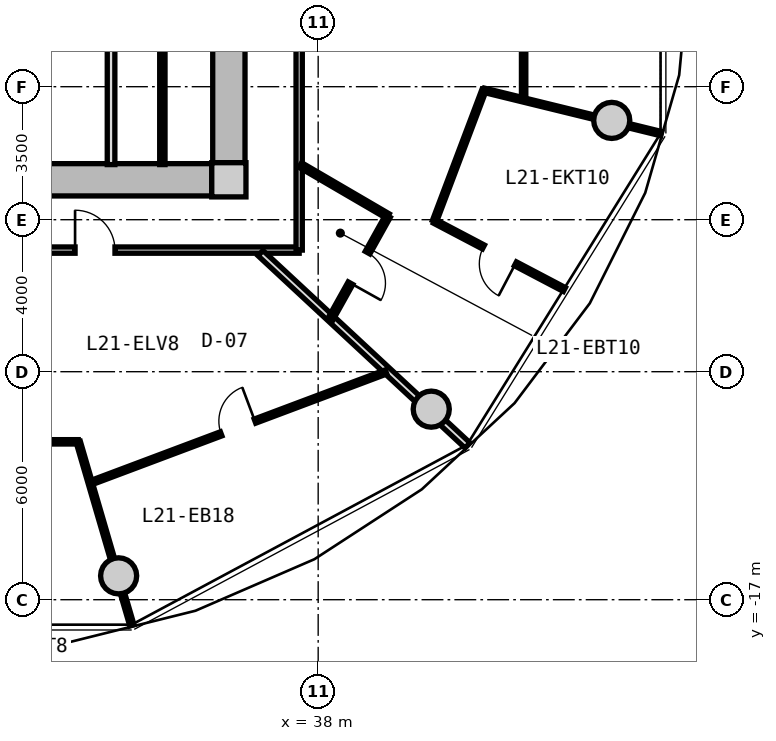
"""IFC4 building model, lengths in metres.
Left out: names, types, materials, properties, quantities, classifications, styles, units other than length and angle.
Written with IfcOpenShell. Run it as: python <this file> out.ifc"""

import sys

from ifc_helpers import new_model, si_unit, direction, frame, frame_2d, origin, origin_2d, place, context, subcontext, project, spatial, rectangle, circle, extrude, source, transform, mapped, element, fill, save


model = new_model("IFC4")
c1 = context("Model", 3, precision=1e-05, world=origin(), true_north=direction((0.0, 1.0)))
c2 = subcontext(c1, "Body", "Model", "MODEL_VIEW")
j1 = project(units=[si_unit("LENGTHUNIT", "METRE"), si_unit("PLANEANGLEUNIT", "RADIAN")], contexts=[c1])
p1 = place(None, origin())
s1 = spatial("IfcSite", under=j1, at=p1, CompositionType="ELEMENT")
p2 = place(p1, origin())
s2 = spatial("IfcBuilding", under=s1, at=p2, CompositionType="ELEMENT")
p3 = place(p2, frame((0.0, 0.0, 70.4)))
s3 = spatial("IfcBuildingStorey", under=s2, at=p3, CompositionType="ELEMENT", Elevation=70.4)
m1 = source(origin(), c2, "Body", "SweptSolid", [
    extrude(rectangle(XDim=0.9, YDim=0.9, at=origin_2d()), origin(), (0.0, 0.0, 1.0), 3.05),
])
p4 = place(p3, frame((35.65, -5.95, 0.0), z_axis=(0.0, 0.0, 1.0), x_axis=(1.0, 0.0, 0.0)))
e1 = element("IfcColumn", 1, at=p4, inside=s3, PredefinedType="COLUMN", context=c2, shape_type="MappedRepresentation", body=[
    mapped(m1, transform((0.0, 0.0, 0.0), x_axis=(1.0, 0.0, 0.0), y_axis=(0.0, 1.0, 0.0), z_axis=(0.0, 0.0, 1.0), scale=1.0)),
])
m2 = source(origin(), c2, "Body", "SweptSolid", [
    extrude(rectangle(XDim=14.4, YDim=0.85, at=frame_2d((7.2, 0.0))), origin(), (0.0, 0.0, 1.0), 2.73),
])
p5 = place(p3, frame((35.2, -5.95, 0.0), z_axis=(0.0, 0.0, 1.0), x_axis=(-1.0, 0.0, 0.0)))
e2 = element("IfcWall", 2, at=p5, inside=s3, PredefinedType="SHEAR", context=c2, shape_type="MappedRepresentation", body=[
    mapped(m2, transform((0.0, 0.0, 0.0), x_axis=(1.0, 0.0, 0.0), y_axis=(0.0, 1.0, 0.0), z_axis=(0.0, 0.0, 1.0), scale=1.0)),
])
m3 = source(origin(), c2, "Body", "SweptSolid", [
    extrude(rectangle(XDim=11.0, YDim=0.85, at=frame_2d((5.5, 0.0))), origin(), (0.0, 0.0, 1.0), 2.73),
])
p6 = place(p3, frame((35.65, 5.5, 0.0), z_axis=(0.0, 0.0, 1.0), x_axis=(0.0, -1.0, 0.0)))
e3 = element("IfcWall", 3, at=p6, inside=s3, PredefinedType="SHEAR", context=c2, shape_type="MappedRepresentation", body=[
    mapped(m3, transform((0.0, 0.0, 0.0), x_axis=(1.0, 0.0, 0.0), y_axis=(0.0, 1.0, 0.0), z_axis=(0.0, 0.0, 1.0), scale=1.0)),
])
p7 = place(p6, frame((5.65, 0.0, 0.0)))
e4 = element("IfcOpeningElement", 4, at=p7, cuts=e3, PredefinedType="OPENING", context=c2, shape_type="SweptSolid", body=[
    extrude(rectangle(XDim=1.2, YDim=2.15, at=frame_2d((0.6, 1.075))), frame((0.0, 0.435, 0.0), z_axis=(0.0, -1.0, 0.0), x_axis=(1.0, 0.0, 0.0)), (0.0, 0.0, 1.0), 0.87),
])
m4 = source(origin(), c2, "Body", "SweptSolid", [
    extrude(circle(Radius=0.475, at=origin_2d()), origin(), (0.0, 0.0, 1.0), 3.05),
])
for number, where, z_axis, x_axis in (
    (5, (32.749, -16.373, 0.0), (0.0, 0.0, 1.0), (1.0, 0.0, 0.0)),
    (6, (40.975, -11.985, 0.0), (0.0, 0.0, 1.0), (1.0, 0.0, 0.0)),
    (7, (45.725, -4.387, 0.0), (0.0, 0.0, 1.0), (1.0, 0.0, 0.0)),
):
    element("IfcColumn", number, at=place(p3, frame(where, z_axis=z_axis, x_axis=x_axis)), inside=s3, PredefinedType="COLUMN", context=c2, shape_type="MappedRepresentation", body=[
        mapped(m4, transform((0.0, 0.0, 0.0), x_axis=(1.0, 0.0, 0.0), y_axis=(0.0, 1.0, 0.0), z_axis=(0.0, 0.0, 1.0), scale=1.0)),
    ])
m5 = source(origin(), c2, "Body", "SweptSolid", [
    extrude(rectangle(XDim=3.8, YDim=0.2, at=frame_2d((1.9, 0.0))), origin(), (0.0, 0.0, 1.0), 2.715),
])
p8 = place(p3, frame((32.55, -5.55, 0.0), z_axis=(0.0, 0.0, 1.0), x_axis=(0.0, 1.0, 0.0)))
e8 = element("IfcWall", 8, at=p8, inside=s3, PredefinedType="PARTITIONING", context=c2, shape_type="MappedRepresentation", body=[
    mapped(m5, transform((0.0, 0.0, 0.0), x_axis=(1.0, 0.0, 0.0), y_axis=(0.0, 1.0, 0.0), z_axis=(0.0, 0.0, 1.0), scale=1.0)),
])
m6 = source(origin(), c2, "Body", "SweptSolid", [
    extrude(rectangle(XDim=3.8, YDim=0.14, at=frame_2d((1.9, 0.0))), origin(), (0.0, 0.0, 1.0), 2.715),
])
p9 = place(p3, frame((33.9, -5.55, 0.0), z_axis=(0.0, 0.0, 1.0), x_axis=(0.0, 1.0, 0.0)))
e9 = element("IfcWall", 9, at=p9, inside=s3, PredefinedType="PARTITIONING", context=c2, shape_type="MappedRepresentation", body=[
    mapped(m6, transform((0.0, 0.0, 0.0), x_axis=(1.0, 0.0, 0.0), y_axis=(0.0, 1.0, 0.0), z_axis=(0.0, 0.0, 1.0), scale=1.0)),
])
m7 = source(origin(), c2, "Body", "SweptSolid", [
    extrude(rectangle(XDim=19.0, YDim=0.165, at=frame_2d((9.5, 0.0))), origin(), (0.0, 0.0, 1.0), 2.715),
])
p10 = place(p3, frame((37.5, -7.8, 0.0), z_axis=(0.0, 0.0, 1.0), x_axis=(-1.0, 0.0, 0.0)))
e10 = element("IfcWall", 10, at=p10, inside=s3, PredefinedType="PARTITIONING", context=c2, shape_type="MappedRepresentation", body=[
    mapped(m7, transform((0.0, 0.0, 0.0), x_axis=(1.0, 0.0, 0.0), y_axis=(0.0, 1.0, 0.0), z_axis=(0.0, 0.0, 1.0), scale=1.0)),
])
p11 = place(p10, frame((14.72, 0.0, 0.0)))
e11 = element("IfcOpeningElement", 11, at=p11, cuts=e10, PredefinedType="OPENING", context=c2, shape_type="SweptSolid", body=[
    extrude(rectangle(XDim=1.05, YDim=2.15, at=frame_2d((0.525, 1.075))), frame((0.0, 0.093, 0.0), z_axis=(0.0, -1.0, 0.0), x_axis=(1.0, 0.0, 0.0)), (0.0, 0.0, 1.0), 0.185),
])
p12 = place(p10, frame((4.847, 0.0, 0.0)))
e12 = element("IfcOpeningElement", 12, at=p12, cuts=e10, PredefinedType="OPENING", context=c2, shape_type="SweptSolid", body=[
    extrude(rectangle(XDim=1.05, YDim=2.15, at=frame_2d((0.525, 1.075))), frame((0.0, 0.093, 0.0), z_axis=(0.0, -1.0, 0.0), x_axis=(1.0, 0.0, 0.0)), (0.0, 0.0, 1.0), 0.185),
])
m8 = source(origin(), c2, "Body", "SweptSolid", [
    extrude(rectangle(XDim=15.6, YDim=0.165, at=frame_2d((7.8, 0.0))), origin(), (0.0, 0.0, 1.0), 2.715),
])
p13 = place(p3, frame((37.5, 7.8, 0.0), z_axis=(0.0, 0.0, 1.0), x_axis=(0.0, -1.0, 0.0)))
e13 = element("IfcWall", 13, at=p13, inside=s3, PredefinedType="PARTITIONING", context=c2, shape_type="MappedRepresentation", body=[
    mapped(m8, transform((0.0, 0.0, 0.0), x_axis=(1.0, 0.0, 0.0), y_axis=(0.0, 1.0, 0.0), z_axis=(0.0, 0.0, 1.0), scale=1.0)),
])
p14 = place(p13, frame((8.835, 0.0, 0.0)))
e14 = element("IfcOpeningElement", 14, at=p14, cuts=e13, PredefinedType="OPENING", context=c2, shape_type="SweptSolid", body=[
    extrude(rectangle(XDim=1.05, YDim=2.15, at=frame_2d((0.525, 1.075))), frame((0.0, 0.093, 0.0), z_axis=(0.0, -1.0, 0.0), x_axis=(1.0, 0.0, 0.0)), (0.0, 0.0, 1.0), 0.185),
])
m9 = source(origin(), c2, "Body", "SweptSolid", [
    extrude(rectangle(XDim=7.435, YDim=0.19, at=frame_2d((3.717, 0.0))), origin(), (0.0, 0.0, 1.0), 2.165),
])
p15 = place(p3, frame((36.483, -7.88, 0.0), z_axis=(0.0, 0.0, 1.0), x_axis=(0.732651956848, -0.680603489652, 0.0)))
e15 = element("IfcWall", 15, at=p15, inside=s3, PredefinedType="PARTITIONING", context=c2, shape_type="MappedRepresentation", body=[
    mapped(m9, transform((0.0, 0.0, 0.0), x_axis=(1.0, 0.0, 0.0), y_axis=(0.0, 1.0, 0.0), z_axis=(0.0, 0.0, 1.0), scale=1.0)),
])
m10 = source(origin(), c2, "Body", "SweptSolid", [
    extrude(rectangle(XDim=8.32, YDim=0.115, at=frame_2d((4.16, 0.0))), origin(), (0.0, 0.0, 1.0), 2.715),
])
p16 = place(p3, frame((31.997, -13.93, 0.0), z_axis=(0.0, 0.0, 1.0), x_axis=(0.936180763098, 0.351518959382, 0.0)))
e16 = element("IfcWall", 16, at=p16, inside=s3, PredefinedType="PARTITIONING", context=c2, shape_type="MappedRepresentation", body=[
    mapped(m10, transform((0.0, 0.0, 0.0), x_axis=(1.0, 0.0, 0.0), y_axis=(0.0, 1.0, 0.0), z_axis=(0.0, 0.0, 1.0), scale=1.0)),
])
p17 = place(p16, frame((3.685, 0.0, 0.0)))
e17 = element("IfcOpeningElement", 17, at=p17, cuts=e16, PredefinedType="OPENING", context=c2, shape_type="SweptSolid", body=[
    extrude(rectangle(XDim=0.95, YDim=2.1, at=frame_2d((0.475, 1.05))), frame((0.0, 0.067, 0.0), z_axis=(0.0, -1.0, 0.0), x_axis=(1.0, 0.0, 0.0)), (0.0, 0.0, 1.0), 0.135),
])
m11 = source(origin(), c2, "Body", "SweptSolid", [
    extrude(rectangle(XDim=5.031, YDim=0.115, at=frame_2d((2.515, 0.0))), origin(), (0.0, 0.0, 1.0), 2.165),
])
p18 = place(p3, frame((31.687, -12.848, 0.0), z_axis=(0.0, 0.0, 1.0), x_axis=(0.280657788738, -0.959807900374, 0.0)))
e18 = element("IfcWall", 18, at=p18, inside=s3, PredefinedType="PARTITIONING", context=c2, shape_type="MappedRepresentation", body=[
    mapped(m11, transform((0.0, 0.0, 0.0), x_axis=(1.0, 0.0, 0.0), y_axis=(0.0, 1.0, 0.0), z_axis=(0.0, 0.0, 1.0), scale=1.0)),
])
m12 = source(origin(), c2, "Body", "SweptSolid", [
    extrude(rectangle(XDim=3.686, YDim=0.115, at=frame_2d((1.843, 0.0))), origin(), (0.0, 0.0, 1.0), 2.715),
])
p19 = place(p3, frame((28.0, -12.848, 0.0), z_axis=(0.0, 0.0, 1.0), x_axis=(0.999999780653, 0.000662339237, 0.0)))
e19 = element("IfcWall", 19, at=p19, inside=s3, PredefinedType="PARTITIONING", context=c2, shape_type="MappedRepresentation", body=[
    mapped(m12, transform((0.0, 0.0, 0.0), x_axis=(1.0, 0.0, 0.0), y_axis=(0.0, 1.0, 0.0), z_axis=(0.0, 0.0, 1.0), scale=1.0)),
])
m13 = source(origin(), c2, "Body", "SweptSolid", [
    extrude(rectangle(XDim=7.709, YDim=0.115, at=frame_2d((3.855, 0.0))), origin(), (0.0, 0.0, 1.0), 2.715),
])
p20 = place(p3, frame((43.406, -3.855, 0.0), z_axis=(0.0, 0.0, 1.0), x_axis=(0.0, 1.0, 0.0)))
e20 = element("IfcWall", 20, at=p20, inside=s3, PredefinedType="PARTITIONING", context=c2, shape_type="MappedRepresentation", body=[
    mapped(m13, transform((0.0, 0.0, 0.0), x_axis=(1.0, 0.0, 0.0), y_axis=(0.0, 1.0, 0.0), z_axis=(0.0, 0.0, 1.0), scale=1.0)),
])
p21 = place(p20, frame((3.38, 0.0, 0.0)))
e21 = element("IfcOpeningElement", 21, at=p21, cuts=e20, PredefinedType="OPENING", context=c2, shape_type="SweptSolid", body=[
    extrude(rectangle(XDim=0.95, YDim=2.1, at=frame_2d((0.475, 1.05))), frame((0.0, 0.067, 0.0), z_axis=(0.0, -1.0, 0.0), x_axis=(1.0, 0.0, 0.0)), (0.0, 0.0, 1.0), 0.135),
])
m14 = source(origin(), c2, "Body", "SweptSolid", [
    extrude(rectangle(XDim=4.803, YDim=0.115, at=frame_2d((2.401, 0.0))), origin(), (0.0, 0.0, 1.0), 2.165),
])
p22 = place(p3, frame((42.364, -3.594, 0.0), z_axis=(0.0, 0.0, 1.0), x_axis=(0.97129155908, -0.237892217736, 0.0)))
e22 = element("IfcWall", 22, at=p22, inside=s3, PredefinedType="PARTITIONING", context=c2, shape_type="MappedRepresentation", body=[
    mapped(m14, transform((0.0, 0.0, 0.0), x_axis=(1.0, 0.0, 0.0), y_axis=(0.0, 1.0, 0.0), z_axis=(0.0, 0.0, 1.0), scale=1.0)),
])
m15 = source(origin(), c2, "Body", "SweptSolid", [
    extrude(rectangle(XDim=2.669, YDim=0.14, at=frame_2d((1.335, 0.0))), origin(), (0.0, 0.0, 1.0), 2.715),
])
p23 = place(p3, frame((37.53, -5.561, 0.0), z_axis=(0.0, 0.0, 1.0), x_axis=(0.86369928178, -0.50400749067, 0.0)))
e23 = element("IfcWall", 23, at=p23, inside=s3, PredefinedType="PARTITIONING", context=c2, shape_type="MappedRepresentation", body=[
    mapped(m15, transform((0.0, 0.0, 0.0), x_axis=(1.0, 0.0, 0.0), y_axis=(0.0, 1.0, 0.0), z_axis=(0.0, 0.0, 1.0), scale=1.0)),
])
m16 = source(origin(), c2, "Body", "SweptSolid", [
    extrude(rectangle(XDim=3.121, YDim=0.14, at=frame_2d((1.561, 0.0))), origin(), (0.0, 0.0, 1.0), 2.715),
])
p24 = place(p3, frame((39.836, -6.906, 0.0), z_axis=(0.0, 0.0, 1.0), x_axis=(-0.487302357327, -0.873233309342, 0.0)))
e24 = element("IfcWall", 24, at=p24, inside=s3, PredefinedType="PARTITIONING", context=c2, shape_type="MappedRepresentation", body=[
    mapped(m16, transform((0.0, 0.0, 0.0), x_axis=(1.0, 0.0, 0.0), y_axis=(0.0, 1.0, 0.0), z_axis=(0.0, 0.0, 1.0), scale=1.0)),
])
p25 = place(p24, frame((1.101, 0.0, 0.0)))
e25 = element("IfcOpeningElement", 25, at=p25, cuts=e24, PredefinedType="OPENING", context=c2, shape_type="SweptSolid", body=[
    extrude(rectangle(XDim=0.92, YDim=2.1, at=frame_2d((0.46, 1.05))), frame((0.0, 0.08, 0.0), z_axis=(0.0, -1.0, 0.0), x_axis=(1.0, 0.0, 0.0)), (0.0, 0.0, 1.0), 0.16),
])
m17 = source(origin(), c2, "Body", "SweptSolid", [
    extrude(rectangle(XDim=3.864, YDim=0.115, at=frame_2d((1.932, 0.0))), origin(), (0.0, 0.0, 1.0), 2.715),
])
p26 = place(p3, frame((41.06, -7.041, 0.0), z_axis=(0.0, 0.0, 1.0), x_axis=(0.885194959803, -0.465220252289, 0.0)))
e26 = element("IfcWall", 26, at=p26, inside=s3, PredefinedType="PARTITIONING", context=c2, shape_type="MappedRepresentation", body=[
    mapped(m17, transform((0.0, 0.0, 0.0), x_axis=(1.0, 0.0, 0.0), y_axis=(0.0, 1.0, 0.0), z_axis=(0.0, 0.0, 1.0), scale=1.0)),
])
p27 = place(p26, frame((1.457, 0.0, 0.0)))
e27 = element("IfcOpeningElement", 27, at=p27, cuts=e26, PredefinedType="OPENING", context=c2, shape_type="SweptSolid", body=[
    extrude(rectangle(XDim=0.95, YDim=2.1, at=frame_2d((0.475, 1.05))), frame((0.0, 0.067, 0.0), z_axis=(0.0, -1.0, 0.0), x_axis=(1.0, 0.0, 0.0)), (0.0, 0.0, 1.0), 0.135),
])
m18 = source(origin(), c2, "Body", "SweptSolid", [
    extrude(rectangle(XDim=3.685, YDim=0.115, at=frame_2d((1.843, 0.0))), origin(), (0.0, 0.0, 1.0), 2.715),
])
p28 = place(p3, frame((41.06, -7.041, 0.0), z_axis=(0.0, 0.0, 1.0), x_axis=(0.353503632997, 0.935433151785, 0.0)))
e28 = element("IfcWall", 28, at=p28, inside=s3, PredefinedType="PARTITIONING", context=c2, shape_type="MappedRepresentation", body=[
    mapped(m18, transform((0.0, 0.0, 0.0), x_axis=(1.0, 0.0, 0.0), y_axis=(0.0, 1.0, 0.0), z_axis=(0.0, 0.0, 1.0), scale=1.0)),
])
m19 = source(origin(), c2, "Body", "SweptSolid", [
    extrude(rectangle(XDim=1.05, YDim=2.15, at=frame_2d((0.525, 1.075))), frame((0.0, 0.025, 0.0), z_axis=(0.0, -1.0, 0.0), x_axis=(1.0, 0.0, 0.0)), (0.0, 0.0, 1.0), 0.05),
])
p29 = place(p12, frame((1.05, 0.0, 0.0), z_axis=(0.0, 0.0, 1.0), x_axis=(-1.0, 0.0, 0.0)))
e29 = element("IfcDoor", 29, at=p29, inside=s3, OperationType="SINGLE_SWING_LEFT", PredefinedType="DOOR", context=c2, shape_type="MappedRepresentation", body=[
    mapped(m19, transform((0.0, 0.0, 0.0), x_axis=(1.0, 0.0, 0.0), y_axis=(0.0, 1.0, 0.0), z_axis=(0.0, 0.0, 1.0), scale=1.0)),
])
fill(e12, e29)
m20 = source(origin(), c2, "Body", "SweptSolid", [
    extrude(rectangle(XDim=0.95, YDim=2.1, at=frame_2d((0.475, 1.05))), frame((0.0, 0.025, 0.0), z_axis=(0.0, -1.0, 0.0), x_axis=(1.0, 0.0, 0.0)), (0.0, 0.0, 1.0), 0.05),
])
p30 = place(p17, origin())
e30 = element("IfcDoor", 30, at=p30, inside=s3, OperationType="SINGLE_SWING_RIGHT", PredefinedType="DOOR", context=c2, shape_type="MappedRepresentation", body=[
    mapped(m20, transform((0.0, 0.0, 0.0), x_axis=(1.0, 0.0, 0.0), y_axis=(0.0, 1.0, 0.0), z_axis=(0.0, 0.0, 1.0), scale=1.0)),
])
fill(e17, e30)
m21 = source(origin(), c2, "Body", "SweptSolid", [
    extrude(rectangle(XDim=0.92, YDim=2.1, at=frame_2d((0.46, 1.05))), frame((0.0, 0.025, 0.0), z_axis=(0.0, -1.0, 0.0), x_axis=(1.0, 0.0, 0.0)), (0.0, 0.0, 1.0), 0.05),
])
p31 = place(p25, origin())
e31 = element("IfcDoor", 31, at=p31, inside=s3, OperationType="SINGLE_SWING_RIGHT", PredefinedType="DOOR", context=c2, shape_type="MappedRepresentation", body=[
    mapped(m21, transform((0.0, 0.0, 0.0), x_axis=(1.0, 0.0, 0.0), y_axis=(0.0, 1.0, 0.0), z_axis=(0.0, 0.0, 1.0), scale=1.0)),
])
fill(e25, e31)
p32 = place(p27, frame((0.95, 0.0, 0.0), z_axis=(0.0, 0.0, 1.0), x_axis=(-1.0, 0.0, 0.0)))
e32 = element("IfcDoor", 32, at=p32, inside=s3, OperationType="SINGLE_SWING_LEFT", PredefinedType="DOOR", context=c2, shape_type="MappedRepresentation", body=[
    mapped(m20, transform((0.0, 0.0, 0.0), x_axis=(1.0, 0.0, 0.0), y_axis=(0.0, 1.0, 0.0), z_axis=(0.0, 0.0, 1.0), scale=1.0)),
])
fill(e27, e32)
save(model, sys.argv[1])
